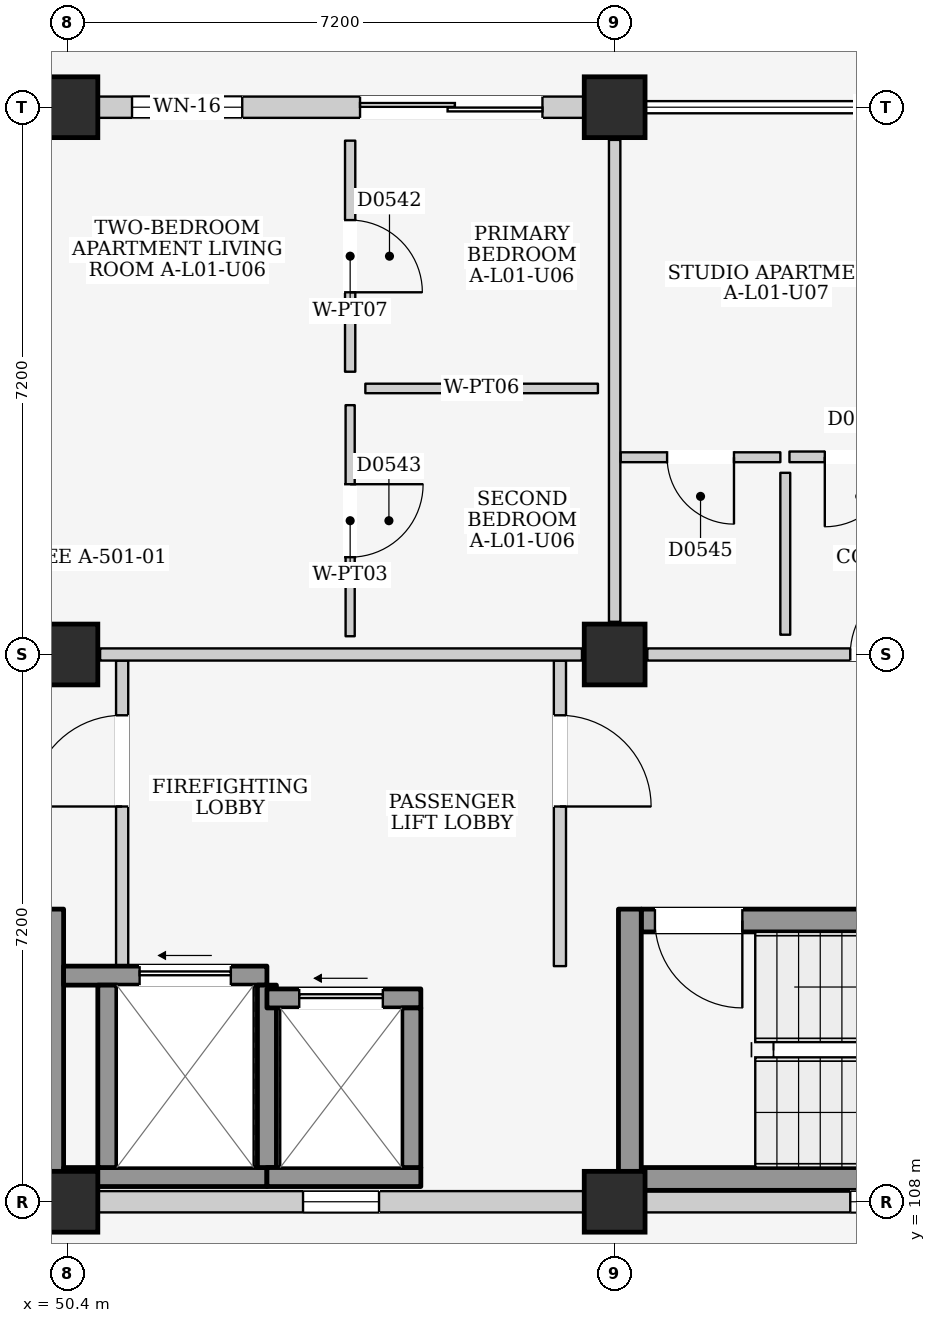
"""IFC4 building model, lengths in metres.
Left out: names, types, materials, properties, quantities, classifications, styles, units other than length and angle.
Written with IfcOpenShell. Run it as: python <this file> out.ifc"""

import sys

from ifc_helpers import new_model, si_unit, direction, frame, frame_2d, origin, origin_2d, place, context, subcontext, project, spatial, rectangle, extrude, element, fill, save


model = new_model("IFC4")
c1 = context("Model", 3, precision=1e-05, world=origin(), true_north=direction((0.0, 1.0)))
c2 = subcontext(c1, "Body", "Model", "MODEL_VIEW")
j1 = project(units=[si_unit("LENGTHUNIT", "METRE"), si_unit("PLANEANGLEUNIT", "RADIAN")], contexts=[c1])
p1 = place(None, origin())
s1 = spatial("IfcSite", under=j1, at=p1, CompositionType="ELEMENT")
p2 = place(p1, origin())
s2 = spatial("IfcBuilding", under=s1, at=p2, CompositionType="ELEMENT")
p3 = place(p2, frame((0.0, 0.0, 4.5)))
s3 = spatial("IfcBuildingStorey", under=s2, at=p3, CompositionType="ELEMENT", Elevation=4.5)
for number, where, z_axis, x_axis in (
    (1, (50.4, 108.0, 0.0), (0.0, 0.0, 1.0), (1.0, 0.0, 0.0)),
    (2, (50.4, 115.2, 0.0), (0.0, 0.0, 1.0), (1.0, 0.0, 0.0)),
    (3, (50.4, 122.4, 0.0), (0.0, 0.0, 1.0), (1.0, 0.0, 0.0)),
    (4, (57.6, 108.0, 0.0), (0.0, 0.0, 1.0), (1.0, 0.0, 0.0)),
    (5, (57.6, 115.2, 0.0), (0.0, 0.0, 1.0), (1.0, 0.0, 0.0)),
    (6, (57.6, 122.4, 0.0), (0.0, 0.0, 1.0), (1.0, 0.0, 0.0)),
):
    element("IfcColumn", number, at=place(p3, frame(where, z_axis=z_axis, x_axis=x_axis)), inside=s3, PredefinedType="COLUMN", context=c2, shape_type="SweptSolid", body=[
        extrude(rectangle(XDim=0.8, YDim=0.8, at=origin_2d()), origin(), (0.0, 0.0, 1.0), 4.5),
    ])
p4 = place(p3, frame((50.8, 122.4, 0.0), z_axis=(0.0, 0.0, 1.0), x_axis=(1.0, 0.0, 0.0)))
e7 = element("IfcWall", 7, at=p4, inside=s3, PredefinedType="ELEMENTEDWALL", context=c2, shape_type="SweptSolid", body=[
    extrude(rectangle(XDim=6.4, YDim=0.28, at=frame_2d((3.2, 0.0))), origin(), (0.0, 0.0, 1.0), 3.715),
])
p5 = place(p4, frame((3.45, 0.0, 0.0)))
e8 = element("IfcOpeningElement", 8, at=p5, cuts=e7, PredefinedType="OPENING", context=c2, shape_type="SweptSolid", body=[
    extrude(rectangle(XDim=2.4, YDim=2.12, at=frame_2d((1.2, 1.06))), frame((0.0, 0.155, 0.0), z_axis=(0.0, -1.0, 0.0), x_axis=(1.0, 0.0, 0.0)), (0.0, 0.0, 1.0), 0.31),
])
p6 = place(p4, frame((0.45, 0.0, 0.9)))
e9 = element("IfcOpeningElement", 9, at=p6, cuts=e7, PredefinedType="OPENING", context=c2, shape_type="SweptSolid", body=[
    extrude(rectangle(XDim=1.45, YDim=1.4, at=frame_2d((0.725, 0.7))), frame((0.0, 0.155, 0.0), z_axis=(0.0, -1.0, 0.0), x_axis=(1.0, 0.0, 0.0)), (0.0, 0.0, 1.0), 0.31),
])
p7 = place(p3, frame((50.8, 108.0, 0.0), z_axis=(0.0, 0.0, 1.0), x_axis=(1.0, 0.0, 0.0)))
e10 = element("IfcWall", 10, at=p7, inside=s3, PredefinedType="ELEMENTEDWALL", context=c2, shape_type="SweptSolid", body=[
    extrude(rectangle(XDim=6.4, YDim=0.28, at=frame_2d((3.2, 0.0))), origin(), (0.0, 0.0, 1.0), 3.585),
])
p8 = place(p7, frame((2.7, 0.0, 1.2)))
e11 = element("IfcOpeningElement", 11, at=p8, cuts=e10, PredefinedType="OPENING", context=c2, shape_type="SweptSolid", body=[
    extrude(rectangle(XDim=1.0, YDim=0.9, at=frame_2d((0.5, 0.45))), frame((0.0, 0.155, 0.0), z_axis=(0.0, -1.0, 0.0), x_axis=(1.0, 0.0, 0.0)), (0.0, 0.0, 1.0), 0.31),
])
p9 = place(p3, frame((58.0, 108.0, 0.0), z_axis=(0.0, 0.0, 1.0), x_axis=(1.0, 0.0, 0.0)))
e12 = element("IfcWall", 12, at=p9, inside=s3, PredefinedType="ELEMENTEDWALL", context=c2, shape_type="SweptSolid", body=[
    extrude(rectangle(XDim=6.4, YDim=0.28, at=frame_2d((3.2, 0.0))), origin(), (0.0, 0.0, 1.0), 3.585),
])
p10 = place(p9, frame((2.7, 0.0, 1.2)))
e13 = element("IfcOpeningElement", 13, at=p10, cuts=e12, PredefinedType="OPENING", context=c2, shape_type="SweptSolid", body=[
    extrude(rectangle(XDim=1.0, YDim=0.9, at=frame_2d((0.5, 0.45))), frame((0.0, 0.155, 0.0), z_axis=(0.0, -1.0, 0.0), x_axis=(1.0, 0.0, 0.0)), (0.0, 0.0, 1.0), 0.31),
])
p11 = place(p3, frame((50.2, 108.15, 0.0), z_axis=(0.0, 0.0, 1.0), x_axis=(0.0, 1.0, 0.0)))
e14 = element("IfcWall", 14, at=p11, inside=s3, PredefinedType="SHEAR", context=c2, shape_type="SweptSolid", body=[
    extrude(rectangle(XDim=3.7, YDim=0.3, at=frame_2d((1.85, 0.0))), origin(), (0.0, 0.0, 1.0), 4.25),
])
p12 = place(p3, frame((51.12, 111.1, 0.0), z_axis=(0.0, 0.0, 1.0), x_axis=(0.0, 1.0, 0.0)))
e15 = element("IfcWall", 15, at=p12, inside=s3, PredefinedType="PARTITIONING", context=c2, shape_type="SweptSolid", body=[
    extrude(rectangle(XDim=4.02, YDim=0.16, at=frame_2d((2.01, 0.0))), origin(), (0.0, 0.0, 1.0), 4.25),
])
p13 = place(p12, frame((2.1, 0.0, 0.0)))
e16 = element("IfcOpeningElement", 16, at=p13, cuts=e15, PredefinedType="OPENING", context=c2, shape_type="SweptSolid", body=[
    extrude(rectangle(XDim=1.2, YDim=2.2, at=frame_2d((0.6, 1.1))), frame((0.0, 0.095, 0.0), z_axis=(0.0, -1.0, 0.0), x_axis=(1.0, 0.0, 0.0)), (0.0, 0.0, 1.0), 0.19),
])
p14 = place(p3, frame((56.88, 111.1, 0.0), z_axis=(0.0, 0.0, 1.0), x_axis=(0.0, 1.0, 0.0)))
e17 = element("IfcWall", 17, at=p14, inside=s3, PredefinedType="PARTITIONING", context=c2, shape_type="SweptSolid", body=[
    extrude(rectangle(XDim=4.02, YDim=0.16, at=frame_2d((2.01, 0.0))), origin(), (0.0, 0.0, 1.0), 4.25),
])
p15 = place(p14, frame((2.1, 0.0, 0.0)))
e18 = element("IfcOpeningElement", 18, at=p15, cuts=e17, PredefinedType="OPENING", context=c2, shape_type="SweptSolid", body=[
    extrude(rectangle(XDim=1.2, YDim=2.2, at=frame_2d((0.6, 1.1))), frame((0.0, 0.095, 0.0), z_axis=(0.0, -1.0, 0.0), x_axis=(1.0, 0.0, 0.0)), (0.0, 0.0, 1.0), 0.19),
])
p16 = place(p3, frame((50.35, 108.325, 0.0), z_axis=(0.0, 0.0, 1.0), x_axis=(1.0, 0.0, 0.0)))
e19 = element("IfcWall", 19, at=p16, inside=s3, PredefinedType="SHEAR", context=c2, shape_type="SweptSolid", body=[
    extrude(rectangle(XDim=2.675, YDim=0.25, at=frame_2d((1.337, 0.0))), origin(), (0.0, 0.0, 1.0), 4.25),
])
p17 = place(p3, frame((50.35, 110.975, 0.0), z_axis=(0.0, 0.0, 1.0), x_axis=(1.0, 0.0, 0.0)))
e20 = element("IfcWall", 20, at=p17, inside=s3, PredefinedType="SHEAR", context=c2, shape_type="SweptSolid", body=[
    extrude(rectangle(XDim=2.675, YDim=0.25, at=frame_2d((1.337, 0.0))), origin(), (0.0, 0.0, 1.0), 4.25),
])
p18 = place(p17, frame((1.0, 0.0, 0.0)))
e21 = element("IfcOpeningElement", 21, at=p18, cuts=e20, PredefinedType="OPENING", context=c2, shape_type="SweptSolid", body=[
    extrude(rectangle(XDim=1.2, YDim=2.25, at=frame_2d((0.6, 1.125))), frame((0.0, 0.14, 0.0), z_axis=(0.0, -1.0, 0.0), x_axis=(1.0, 0.0, 0.0)), (0.0, 0.0, 1.0), 0.28),
])
for number, where, z_axis, x_axis in (
    (22, (50.925, 108.45, 0.0), (0.0, 0.0, 1.0), (0.0, 1.0, 0.0)),
    (23, (53.025, 108.45, 0.0), (0.0, 0.0, 1.0), (0.0, 1.0, 0.0)),
):
    element("IfcWall", number, at=place(p3, frame(where, z_axis=z_axis, x_axis=x_axis)), inside=s3, PredefinedType="SHEAR", context=c2, shape_type="SweptSolid", body=[
        extrude(rectangle(XDim=2.4, YDim=0.25, at=frame_2d((1.2, 0.0))), origin(), (0.0, 0.0, 1.0), 4.25),
    ])
p19 = place(p3, frame((53.025, 108.325, 0.0), z_axis=(0.0, 0.0, 1.0), x_axis=(1.0, 0.0, 0.0)))
e24 = element("IfcWall", 24, at=p19, inside=s3, PredefinedType="SHEAR", context=c2, shape_type="SweptSolid", body=[
    extrude(rectangle(XDim=2.025, YDim=0.25, at=frame_2d((1.013, 0.0))), origin(), (0.0, 0.0, 1.0), 4.25),
])
p20 = place(p3, frame((53.025, 110.675, 0.0), z_axis=(0.0, 0.0, 1.0), x_axis=(1.0, 0.0, 0.0)))
e25 = element("IfcWall", 25, at=p20, inside=s3, PredefinedType="SHEAR", context=c2, shape_type="SweptSolid", body=[
    extrude(rectangle(XDim=2.025, YDim=0.25, at=frame_2d((1.013, 0.0))), origin(), (0.0, 0.0, 1.0), 4.25),
])
p21 = place(p20, frame((0.425, 0.0, 0.0)))
e26 = element("IfcOpeningElement", 26, at=p21, cuts=e25, PredefinedType="OPENING", context=c2, shape_type="SweptSolid", body=[
    extrude(rectangle(XDim=1.1, YDim=2.15, at=frame_2d((0.55, 1.075))), frame((0.0, 0.14, 0.0), z_axis=(0.0, -1.0, 0.0), x_axis=(1.0, 0.0, 0.0)), (0.0, 0.0, 1.0), 0.28),
])
p22 = place(p3, frame((54.925, 108.45, 0.0), z_axis=(0.0, 0.0, 1.0), x_axis=(0.0, 1.0, 0.0)))
e27 = element("IfcWall", 27, at=p22, inside=s3, PredefinedType="SHEAR", context=c2, shape_type="SweptSolid", body=[
    extrude(rectangle(XDim=2.1, YDim=0.25, at=frame_2d((1.05, 0.0))), origin(), (0.0, 0.0, 1.0), 4.25),
])
p23 = place(p3, frame((57.95, 108.3, 0.0), z_axis=(0.0, 0.0, 1.0), x_axis=(1.0, 0.0, 0.0)))
e28 = element("IfcWall", 28, at=p23, inside=s3, PredefinedType="SHEAR", context=c2, shape_type="SweptSolid", body=[
    extrude(rectangle(XDim=6.5, YDim=0.3, at=frame_2d((3.25, 0.0))), origin(), (0.0, 0.0, 1.0), 4.25),
])
p24 = place(p3, frame((57.95, 111.7, 0.0), z_axis=(0.0, 0.0, 1.0), x_axis=(1.0, 0.0, 0.0)))
e29 = element("IfcWall", 29, at=p24, inside=s3, PredefinedType="SHEAR", context=c2, shape_type="SweptSolid", body=[
    extrude(rectangle(XDim=6.5, YDim=0.3, at=frame_2d((3.25, 0.0))), origin(), (0.0, 0.0, 1.0), 4.25),
])
p25 = place(p24, frame((0.18, 0.0, 0.0)))
e30 = element("IfcOpeningElement", 30, at=p25, cuts=e29, PredefinedType="OPENING", context=c2, shape_type="SweptSolid", body=[
    extrude(rectangle(XDim=1.15, YDim=2.2, at=frame_2d((0.575, 1.1))), frame((0.0, 0.165, 0.0), z_axis=(0.0, -1.0, 0.0), x_axis=(1.0, 0.0, 0.0)), (0.0, 0.0, 1.0), 0.33),
])
p26 = place(p3, frame((57.8, 108.15, 0.0), z_axis=(0.0, 0.0, 1.0), x_axis=(0.0, 1.0, 0.0)))
e31 = element("IfcWall", 31, at=p26, inside=s3, PredefinedType="SHEAR", context=c2, shape_type="SweptSolid", body=[
    extrude(rectangle(XDim=3.7, YDim=0.3, at=frame_2d((1.85, 0.0))), origin(), (0.0, 0.0, 1.0), 4.25),
])
p27 = place(p3, frame((50.83, 115.2, 0.0), z_axis=(0.0, 0.0, 1.0), x_axis=(1.0, 0.0, 0.0)))
e32 = element("IfcWall", 32, at=p27, inside=s3, PredefinedType="PARTITIONING", context=c2, shape_type="SweptSolid", body=[
    extrude(rectangle(XDim=6.34, YDim=0.16, at=frame_2d((3.17, 0.0))), origin(), (0.0, 0.0, 1.0), 3.585),
])
p28 = place(p3, frame((57.6, 115.63, 0.0), z_axis=(0.0, 0.0, 1.0), x_axis=(0.0, 1.0, 0.0)))
e33 = element("IfcWall", 33, at=p28, inside=s3, PredefinedType="PARTITIONING", context=c2, shape_type="SweptSolid", body=[
    extrude(rectangle(XDim=6.34, YDim=0.15, at=frame_2d((3.17, 0.0))), origin(), (0.0, 0.0, 1.0), 3.685),
])
p29 = place(p3, frame((54.12, 118.92, 0.0), z_axis=(0.0, 0.0, 1.0), x_axis=(0.0, 1.0, 0.0)))
e34 = element("IfcWall", 34, at=p29, inside=s3, PredefinedType="PARTITIONING", context=c2, shape_type="SweptSolid", body=[
    extrude(rectangle(XDim=3.04, YDim=0.135, at=frame_2d((1.52, 0.0))), origin(), (0.0, 0.0, 1.0), 4.25),
])
p30 = place(p29, frame((1.045, 0.0, 0.0)))
e35 = element("IfcOpeningElement", 35, at=p30, cuts=e34, PredefinedType="OPENING", context=c2, shape_type="SweptSolid", body=[
    extrude(rectangle(XDim=0.95, YDim=2.15, at=frame_2d((0.475, 1.075))), frame((0.0, 0.083, 0.0), z_axis=(0.0, -1.0, 0.0), x_axis=(1.0, 0.0, 0.0)), (0.0, 0.0, 1.0), 0.165),
])
p31 = place(p3, frame((54.32, 118.7, 0.0), z_axis=(0.0, 0.0, 1.0), x_axis=(1.0, 0.0, 0.0)))
e36 = element("IfcWall", 36, at=p31, inside=s3, PredefinedType="PARTITIONING", context=c2, shape_type="SweptSolid", body=[
    extrude(rectangle(XDim=3.06, YDim=0.125, at=frame_2d((1.53, 0.0))), origin(), (0.0, 0.0, 1.0), 4.25),
])
p32 = place(p3, frame((54.12, 115.44, 0.0), z_axis=(0.0, 0.0, 1.0), x_axis=(0.0, 1.0, 0.0)))
e37 = element("IfcWall", 37, at=p32, inside=s3, PredefinedType="PARTITIONING", context=c2, shape_type="SweptSolid", body=[
    extrude(rectangle(XDim=3.04, YDim=0.12, at=frame_2d((1.52, 0.0))), origin(), (0.0, 0.0, 1.0), 4.25),
])
p33 = place(p32, frame((1.04, 0.0, 0.0)))
e38 = element("IfcOpeningElement", 38, at=p33, cuts=e37, PredefinedType="OPENING", context=c2, shape_type="SweptSolid", body=[
    extrude(rectangle(XDim=0.96, YDim=2.15, at=frame_2d((0.48, 1.075))), frame((0.0, 0.075, 0.0), z_axis=(0.0, -1.0, 0.0), x_axis=(1.0, 0.0, 0.0)), (0.0, 0.0, 1.0), 0.15),
])
p34 = place(p3, frame((58.03, 115.2, 0.0), z_axis=(0.0, 0.0, 1.0), x_axis=(1.0, 0.0, 0.0)))
e39 = element("IfcWall", 39, at=p34, inside=s3, PredefinedType="PARTITIONING", context=c2, shape_type="SweptSolid", body=[
    extrude(rectangle(XDim=6.34, YDim=0.16, at=frame_2d((3.17, 0.0))), origin(), (0.0, 0.0, 1.0), 3.585),
])
p35 = place(p34, frame((2.67, 0.0, 0.0)))
e40 = element("IfcOpeningElement", 40, at=p35, cuts=e39, PredefinedType="OPENING", context=c2, shape_type="SweptSolid", body=[
    extrude(rectangle(XDim=1.0, YDim=2.15, at=frame_2d((0.5, 1.075))), frame((0.0, 0.095, 0.0), z_axis=(0.0, -1.0, 0.0), x_axis=(1.0, 0.0, 0.0)), (0.0, 0.0, 1.0), 0.19),
])
p36 = place(p3, frame((57.68, 117.795, 0.0), z_axis=(0.0, 0.0, 1.0), x_axis=(1.0, 0.0, 0.0)))
e41 = element("IfcWall", 41, at=p36, inside=s3, PredefinedType="PARTITIONING", context=c2, shape_type="SweptSolid", body=[
    extrude(rectangle(XDim=2.1, YDim=0.13, at=frame_2d((1.05, 0.0))), origin(), (0.0, 0.0, 1.0), 4.25),
])
p37 = place(p36, frame((0.61, 0.0, 0.0)))
e42 = element("IfcOpeningElement", 42, at=p37, cuts=e41, PredefinedType="OPENING", context=c2, shape_type="SweptSolid", body=[
    extrude(rectangle(XDim=0.88, YDim=2.1, at=frame_2d((0.44, 1.05))), frame((0.0, 0.08, 0.0), z_axis=(0.0, -1.0, 0.0), x_axis=(1.0, 0.0, 0.0)), (0.0, 0.0, 1.0), 0.16),
])
p38 = place(p3, frame((59.845, 115.46, 0.0), z_axis=(0.0, 0.0, 1.0), x_axis=(0.0, 1.0, 0.0)))
e43 = element("IfcWall", 43, at=p38, inside=s3, PredefinedType="PARTITIONING", context=c2, shape_type="SweptSolid", body=[
    extrude(rectangle(XDim=2.13, YDim=0.13, at=frame_2d((1.065, 0.0))), origin(), (0.0, 0.0, 1.0), 4.25),
])
p39 = place(p3, frame((59.9, 117.8, 0.0), z_axis=(0.0, 0.0, 1.0), x_axis=(1.0, 0.0, 0.0)))
e44 = element("IfcWall", 44, at=p39, inside=s3, PredefinedType="PARTITIONING", context=c2, shape_type="SweptSolid", body=[
    extrude(rectangle(XDim=1.85, YDim=0.14, at=frame_2d((0.925, 0.0))), origin(), (0.0, 0.0, 1.0), 4.25),
])
p40 = place(p39, frame((0.465, 0.0, 0.0)))
e45 = element("IfcOpeningElement", 45, at=p40, cuts=e44, PredefinedType="OPENING", context=c2, shape_type="SweptSolid", body=[
    extrude(rectangle(XDim=0.92, YDim=2.1, at=frame_2d((0.46, 1.05))), frame((0.0, 0.085, 0.0), z_axis=(0.0, -1.0, 0.0), x_axis=(1.0, 0.0, 0.0)), (0.0, 0.0, 1.0), 0.17),
])
p41 = place(p5, frame((2.4, 0.0, 0.0), z_axis=(0.0, 0.0, 1.0), x_axis=(-1.0, 0.0, 0.0)))
e46 = element("IfcDoor", 46, at=p41, inside=s3, OperationType="DOUBLE_DOOR_SLIDING", PredefinedType="DOOR", context=c2, shape_type="SweptSolid", body=[
    extrude(rectangle(XDim=2.4, YDim=2.12, at=frame_2d((1.2, 1.06))), frame((0.0, 0.025, 0.0), z_axis=(0.0, -1.0, 0.0), x_axis=(1.0, 0.0, 0.0)), (0.0, 0.0, 1.0), 0.05),
])
fill(e8, e46)
p42 = place(p6, origin())
e47 = element("IfcWindow", 47, at=p42, inside=s3, PartitioningType="DOUBLE_PANEL_VERTICAL", PredefinedType="WINDOW", context=c2, shape_type="SweptSolid", body=[
    extrude(rectangle(XDim=1.45, YDim=1.4, at=frame_2d((0.725, 0.7))), frame((0.0, 0.03, 0.0), z_axis=(0.0, -1.0, 0.0), x_axis=(1.0, 0.0, 0.0)), (0.0, 0.0, 1.0), 0.06),
])
fill(e9, e47)
p43 = place(p8, origin())
e48 = element("IfcWindow", 48, at=p43, inside=s3, PartitioningType="SINGLE_PANEL", PredefinedType="WINDOW", context=c2, shape_type="SweptSolid", body=[
    extrude(rectangle(XDim=1.0, YDim=0.9, at=frame_2d((0.5, 0.45))), frame((0.0, 0.03, 0.0), z_axis=(0.0, -1.0, 0.0), x_axis=(1.0, 0.0, 0.0)), (0.0, 0.0, 1.0), 0.06),
])
fill(e11, e48)
p44 = place(p10, origin())
e49 = element("IfcWindow", 49, at=p44, inside=s3, PartitioningType="SINGLE_PANEL", PredefinedType="WINDOW", context=c2, shape_type="SweptSolid", body=[
    extrude(rectangle(XDim=1.0, YDim=0.9, at=frame_2d((0.5, 0.45))), frame((0.0, 0.03, 0.0), z_axis=(0.0, -1.0, 0.0), x_axis=(1.0, 0.0, 0.0)), (0.0, 0.0, 1.0), 0.06),
])
fill(e13, e49)
p45 = place(p13, origin())
e50 = element("IfcDoor", 50, at=p45, inside=s3, OperationType="SINGLE_SWING_LEFT", PredefinedType="DOOR", context=c2, shape_type="SweptSolid", body=[
    extrude(rectangle(XDim=1.2, YDim=2.2, at=frame_2d((0.6, 1.1))), frame((0.0, 0.025, 0.0), z_axis=(0.0, -1.0, 0.0), x_axis=(1.0, 0.0, 0.0)), (0.0, 0.0, 1.0), 0.05),
])
fill(e16, e50)
p46 = place(p15, frame((1.2, 0.0, 0.0), z_axis=(0.0, 0.0, 1.0), x_axis=(-1.0, 0.0, 0.0)))
e51 = element("IfcDoor", 51, at=p46, inside=s3, OperationType="SINGLE_SWING_RIGHT", PredefinedType="DOOR", context=c2, shape_type="SweptSolid", body=[
    extrude(rectangle(XDim=1.2, YDim=2.2, at=frame_2d((0.6, 1.1))), frame((0.0, 0.025, 0.0), z_axis=(0.0, -1.0, 0.0), x_axis=(1.0, 0.0, 0.0)), (0.0, 0.0, 1.0), 0.05),
])
fill(e18, e51)
p47 = place(p18, origin())
e52 = element("IfcDoor", 52, at=p47, inside=s3, OperationType="SLIDING_TO_LEFT", PredefinedType="DOOR", context=c2, shape_type="SweptSolid", body=[
    extrude(rectangle(XDim=1.2, YDim=2.25, at=frame_2d((0.6, 1.125))), frame((0.0, 0.025, 0.0), z_axis=(0.0, -1.0, 0.0), x_axis=(1.0, 0.0, 0.0)), (0.0, 0.0, 1.0), 0.05),
])
fill(e21, e52)
p48 = place(p21, origin())
e53 = element("IfcDoor", 53, at=p48, inside=s3, OperationType="SLIDING_TO_LEFT", PredefinedType="DOOR", context=c2, shape_type="SweptSolid", body=[
    extrude(rectangle(XDim=1.1, YDim=2.15, at=frame_2d((0.55, 1.075))), frame((0.0, 0.025, 0.0), z_axis=(0.0, -1.0, 0.0), x_axis=(1.0, 0.0, 0.0)), (0.0, 0.0, 1.0), 0.05),
])
fill(e26, e53)
p49 = place(p25, frame((1.15, 0.0, 0.0), z_axis=(0.0, 0.0, 1.0), x_axis=(-1.0, 0.0, 0.0)))
e54 = element("IfcDoor", 54, at=p49, inside=s3, OperationType="SINGLE_SWING_LEFT", PredefinedType="DOOR", context=c2, shape_type="SweptSolid", body=[
    extrude(rectangle(XDim=1.15, YDim=2.2, at=frame_2d((0.575, 1.1))), frame((0.0, 0.025, 0.0), z_axis=(0.0, -1.0, 0.0), x_axis=(1.0, 0.0, 0.0)), (0.0, 0.0, 1.0), 0.05),
])
fill(e30, e54)
p50 = place(p30, frame((0.95, 0.0, 0.0), z_axis=(0.0, 0.0, 1.0), x_axis=(-1.0, 0.0, 0.0)))
e55 = element("IfcDoor", 55, at=p50, inside=s3, OperationType="SINGLE_SWING_RIGHT", PredefinedType="DOOR", context=c2, shape_type="SweptSolid", body=[
    extrude(rectangle(XDim=0.95, YDim=2.15, at=frame_2d((0.475, 1.075))), frame((0.0, 0.025, 0.0), z_axis=(0.0, -1.0, 0.0), x_axis=(1.0, 0.0, 0.0)), (0.0, 0.0, 1.0), 0.05),
])
fill(e35, e55)
p51 = place(p33, frame((0.96, 0.0, 0.0), z_axis=(0.0, 0.0, 1.0), x_axis=(-1.0, 0.0, 0.0)))
e56 = element("IfcDoor", 56, at=p51, inside=s3, OperationType="SINGLE_SWING_LEFT", PredefinedType="DOOR", context=c2, shape_type="SweptSolid", body=[
    extrude(rectangle(XDim=0.96, YDim=2.15, at=frame_2d((0.48, 1.075))), frame((0.0, 0.025, 0.0), z_axis=(0.0, -1.0, 0.0), x_axis=(1.0, 0.0, 0.0)), (0.0, 0.0, 1.0), 0.05),
])
fill(e38, e56)
p52 = place(p35, origin())
e57 = element("IfcDoor", 57, at=p52, inside=s3, OperationType="SINGLE_SWING_RIGHT", PredefinedType="DOOR", context=c2, shape_type="SweptSolid", body=[
    extrude(rectangle(XDim=1.0, YDim=2.15, at=frame_2d((0.5, 1.075))), frame((0.0, 0.025, 0.0), z_axis=(0.0, -1.0, 0.0), x_axis=(1.0, 0.0, 0.0)), (0.0, 0.0, 1.0), 0.05),
])
fill(e40, e57)
p53 = place(p37, frame((0.88, 0.0, 0.0), z_axis=(0.0, 0.0, 1.0), x_axis=(-1.0, 0.0, 0.0)))
e58 = element("IfcDoor", 58, at=p53, inside=s3, OperationType="SINGLE_SWING_LEFT", PredefinedType="DOOR", context=c2, shape_type="SweptSolid", body=[
    extrude(rectangle(XDim=0.88, YDim=2.1, at=frame_2d((0.44, 1.05))), frame((0.0, 0.025, 0.0), z_axis=(0.0, -1.0, 0.0), x_axis=(1.0, 0.0, 0.0)), (0.0, 0.0, 1.0), 0.05),
])
fill(e42, e58)
p54 = place(p40, frame((0.92, 0.0, 0.0), z_axis=(0.0, 0.0, 1.0), x_axis=(-1.0, 0.0, 0.0)))
e59 = element("IfcDoor", 59, at=p54, inside=s3, OperationType="SINGLE_SWING_RIGHT", PredefinedType="DOOR", context=c2, shape_type="SweptSolid", body=[
    extrude(rectangle(XDim=0.92, YDim=2.1, at=frame_2d((0.46, 1.05))), frame((0.0, 0.025, 0.0), z_axis=(0.0, -1.0, 0.0), x_axis=(1.0, 0.0, 0.0)), (0.0, 0.0, 1.0), 0.05),
])
fill(e45, e59)
save(model, sys.argv[1])
